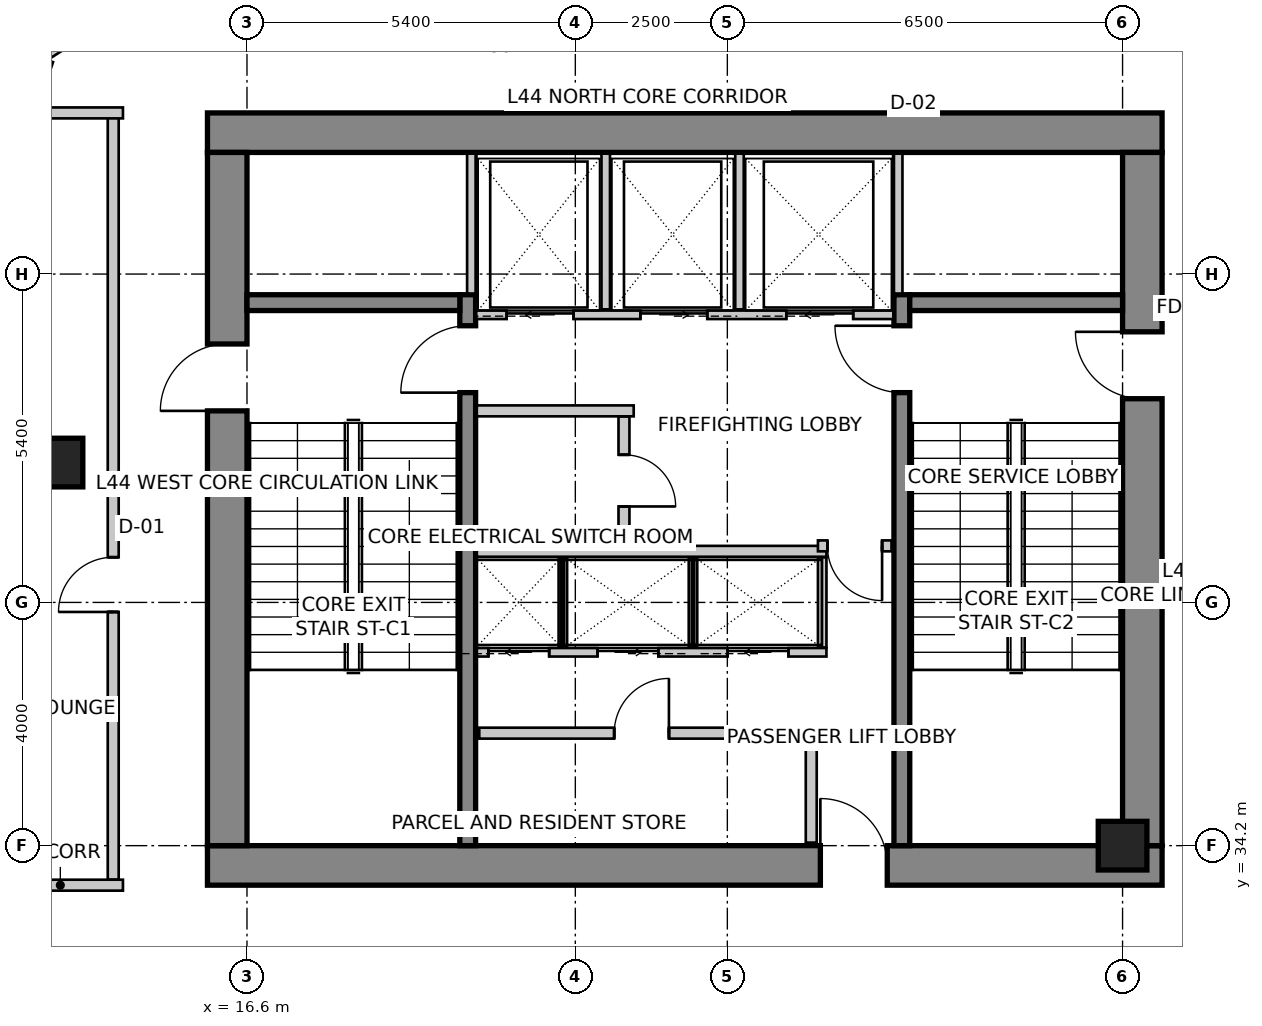
"""IFC4 building model, lengths in metres.
Left out: names, types, materials, properties, quantities, classifications, styles, units other than length and angle.
Written with IfcOpenShell. Run it as: python <this file> out.ifc"""

import sys

from ifc_helpers import new_model, si_unit, direction, frame, frame_2d, origin, origin_2d, place, context, subcontext, project, spatial, rectangle, extrude, source, transform, mapped, element, fill, save


model = new_model("IFC4")
c1 = context("Model", 3, precision=1e-05, world=origin(), true_north=direction((0.0, 1.0)))
c2 = subcontext(c1, "Body", "Model", "MODEL_VIEW")
j1 = project(units=[si_unit("LENGTHUNIT", "METRE"), si_unit("PLANEANGLEUNIT", "RADIAN")], contexts=[c1])
p1 = place(None, origin())
s1 = spatial("IfcSite", under=j1, at=p1, CompositionType="ELEMENT")
p2 = place(p1, origin())
s2 = spatial("IfcBuilding", under=s1, at=p2, CompositionType="ELEMENT")
p3 = place(p2, frame((0.0, 0.0, 178.2)))
s3 = spatial("IfcBuildingStorey", under=s2, at=p3, CompositionType="ELEMENT", Elevation=178.2)
p4 = place(p3, frame((15.95, 45.925, 0.0), z_axis=(0.0, 0.0, 1.0), x_axis=(1.0, 0.0, 0.0)))
e1 = element("IfcWall", 1, at=p4, inside=s3, PredefinedType="SHEAR", context=c2, shape_type="SweptSolid", body=[
    extrude(rectangle(XDim=15.7, YDim=0.65, at=frame_2d((7.85, 0.0))), origin(), (0.0, 0.0, 1.0), 5.2),
])
p5 = place(p3, frame((15.95, 33.875, 0.0), z_axis=(0.0, 0.0, 1.0), x_axis=(1.0, 0.0, 0.0)))
e2 = element("IfcWall", 2, at=p5, inside=s3, PredefinedType="SHEAR", context=c2, shape_type="SweptSolid", body=[
    extrude(rectangle(XDim=15.7, YDim=0.65, at=frame_2d((7.85, 0.0))), origin(), (0.0, 0.0, 1.0), 5.2),
])
m1 = source(origin(), c2, "Body", "SweptSolid", [
    extrude(rectangle(XDim=1.1, YDim=2.15, at=frame_2d((0.55, 1.075))), frame((0.0, 0.335, 0.0), z_axis=(0.0, -1.0, 0.0), x_axis=(1.0, 0.0, 0.0)), (0.0, 0.0, 1.0), 0.67),
])
p6 = place(p5, frame((10.08, 0.0, 0.0)))
e3 = element("IfcOpeningElement", 3, at=p6, cuts=e2, PredefinedType="OPENING", context=c2, shape_type="MappedRepresentation", body=[
    mapped(m1, transform((0.0, 0.0, 0.0), scale=1.0)),
])
p7 = place(p3, frame((16.275, 34.2, 0.0), z_axis=(0.0, 0.0, 1.0), x_axis=(0.0, 1.0, 0.0)))
e4 = element("IfcWall", 4, at=p7, inside=s3, PredefinedType="SHEAR", context=c2, shape_type="SweptSolid", body=[
    extrude(rectangle(XDim=11.4, YDim=0.65, at=frame_2d((5.7, 0.0))), origin(), (0.0, 0.0, 1.0), 5.2),
])
p8 = place(p7, frame((7.15, 0.0, 0.0)))
e5 = element("IfcOpeningElement", 5, at=p8, cuts=e4, PredefinedType="OPENING", context=c2, shape_type="MappedRepresentation", body=[
    mapped(m1, transform((0.0, 0.0, 0.0), scale=1.0)),
])
p9 = place(p3, frame((31.325, 34.2, 0.0), z_axis=(0.0, 0.0, 1.0), x_axis=(0.0, 1.0, 0.0)))
e6 = element("IfcWall", 6, at=p9, inside=s3, PredefinedType="SHEAR", context=c2, shape_type="SweptSolid", body=[
    extrude(rectangle(XDim=11.4, YDim=0.65, at=frame_2d((5.7, 0.0))), origin(), (0.0, 0.0, 1.0), 5.2),
])
p10 = place(p9, frame((7.35, 0.0, 0.0)))
e7 = element("IfcOpeningElement", 7, at=p10, cuts=e6, PredefinedType="OPENING", context=c2, shape_type="MappedRepresentation", body=[
    mapped(m1, transform((0.0, 0.0, 0.0), scale=1.0)),
])
p11 = place(p3, frame((20.23, 34.2, 0.0), z_axis=(0.0, 0.0, 1.0), x_axis=(0.0, 1.0, 0.0)))
e8 = element("IfcWall", 8, at=p11, inside=s3, PredefinedType="SHEAR", context=c2, shape_type="SweptSolid", body=[
    extrude(rectangle(XDim=9.06, YDim=0.26, at=frame_2d((4.53, 0.0))), origin(), (0.0, 0.0, 1.0), 5.2),
])
m2 = source(origin(), c2, "Body", "SweptSolid", [
    extrude(rectangle(XDim=1.1, YDim=2.15, at=frame_2d((0.55, 1.075))), frame((0.0, 0.14, 0.0), z_axis=(0.0, -1.0, 0.0), x_axis=(1.0, 0.0, 0.0)), (0.0, 0.0, 1.0), 0.28),
])
p12 = place(p11, frame((7.45, 0.0, 0.0)))
e9 = element("IfcOpeningElement", 9, at=p12, cuts=e8, PredefinedType="OPENING", context=c2, shape_type="MappedRepresentation", body=[
    mapped(m2, transform((0.0, 0.0, 0.0), scale=1.0)),
])
p13 = place(p3, frame((27.37, 34.2, 0.0), z_axis=(0.0, 0.0, 1.0), x_axis=(0.0, 1.0, 0.0)))
e10 = element("IfcWall", 10, at=p13, inside=s3, PredefinedType="SHEAR", context=c2, shape_type="SweptSolid", body=[
    extrude(rectangle(XDim=9.06, YDim=0.26, at=frame_2d((4.53, 0.0))), origin(), (0.0, 0.0, 1.0), 5.2),
])
p14 = place(p13, frame((7.45, 0.0, 0.0)))
e11 = element("IfcOpeningElement", 11, at=p14, cuts=e10, PredefinedType="OPENING", context=c2, shape_type="MappedRepresentation", body=[
    mapped(m2, transform((0.0, 0.0, 0.0), scale=1.0)),
])
for number, where, z_axis, x_axis in (
    (12, (16.6, 43.13, 0.0), (0.0, 0.0, 1.0), (1.0, 0.0, 0.0)),
    (13, (27.5, 43.13, 0.0), (0.0, 0.0, 1.0), (1.0, 0.0, 0.0)),
):
    element("IfcWall", number, at=place(p3, frame(where, z_axis=z_axis, x_axis=x_axis)), inside=s3, PredefinedType="SHEAR", context=c2, shape_type="SweptSolid", body=[
        extrude(rectangle(XDim=3.5, YDim=0.26, at=frame_2d((1.75, 0.0))), origin(), (0.0, 0.0, 1.0), 5.2),
    ])
m3 = source(origin(), c2, "Body", "SweptSolid", [
    extrude(rectangle(XDim=0.8, YDim=0.8, at=origin_2d()), origin(), (0.0, 0.0, 1.0), 5.2),
])
for number, where, z_axis, x_axis in (
    (14, (13.5, 40.5, 0.0), (0.0, 0.0, 1.0), (1.0, 0.0, 0.0)),
    (15, (31.0, 34.2, 0.0), (0.0, 0.0, 1.0), (1.0, 0.0, 0.0)),
):
    element("IfcColumn", number, at=place(p3, frame(where, z_axis=z_axis, x_axis=x_axis)), inside=s3, PredefinedType="COLUMN", context=c2, shape_type="MappedRepresentation", body=[
        mapped(m3, transform((0.0, 0.0, 0.0), scale=1.0)),
    ])
p15 = place(p3, frame((21.875, 52.742, 0.0), z_axis=(0.0, 0.0, 1.0), x_axis=(-0.843666375448, -0.536867811419, 0.0)))
e16 = element("IfcWall", 16, at=p15, inside=s3, PredefinedType="SOLIDWALL", context=c2, shape_type="SweptSolid", body=[
    extrude(rectangle(XDim=10.284, YDim=0.3, at=frame_2d((5.142, 0.0))), origin(), (0.0, 0.0, 1.0), 4.95),
])
m4 = source(origin(), c2, "Body", "SweptSolid", [
    extrude(rectangle(XDim=2.4, YDim=2.2, at=frame_2d((1.2, 1.1))), frame((0.0, 0.16, 0.0), z_axis=(0.0, -1.0, 0.0), x_axis=(1.0, 0.0, 0.0)), (0.0, 0.0, 1.0), 0.32),
])
p16 = place(p15, frame((3.307, 0.0, 0.85)))
e17 = element("IfcOpeningElement", 17, at=p16, cuts=e16, PredefinedType="OPENING", context=c2, shape_type="MappedRepresentation", body=[
    mapped(m4, transform((0.0, 0.0, 0.0), scale=1.0)),
])
p17 = place(p3, frame((13.269, 47.134, 0.0), z_axis=(0.0, 0.0, 1.0), x_axis=(-0.319920776449, -0.947444297464, 0.0)))
e18 = element("IfcWall", 18, at=p17, inside=s3, PredefinedType="SOLIDWALL", context=c2, shape_type="SweptSolid", body=[
    extrude(rectangle(XDim=16.133, YDim=0.3, at=frame_2d((8.067, 0.0))), origin(), (0.0, 0.0, 1.0), 4.95),
])
m5 = source(origin(), c2, "Body", "SweptSolid", [
    extrude(rectangle(XDim=2.8, YDim=2.4, at=frame_2d((1.4, 1.2))), frame((0.0, 0.16, 0.0), z_axis=(0.0, -1.0, 0.0), x_axis=(1.0, 0.0, 0.0)), (0.0, 0.0, 1.0), 0.32),
])
p18 = place(p17, frame((2.163, 0.0, 0.85)))
e19 = element("IfcOpeningElement", 19, at=p18, cuts=e18, PredefinedType="OPENING", context=c2, shape_type="MappedRepresentation", body=[
    mapped(m5, transform((0.0, 0.0, 0.0), scale=1.0)),
])
p19 = place(p17, frame((7.26, 0.0, 0.85)))
e20 = element("IfcOpeningElement", 20, at=p19, cuts=e18, PredefinedType="OPENING", context=c2, shape_type="MappedRepresentation", body=[
    mapped(m4, transform((0.0, 0.0, 0.0), scale=1.0)),
])
p20 = place(p17, frame((11.957, 0.0, 0.85)))
e21 = element("IfcOpeningElement", 21, at=p20, cuts=e18, PredefinedType="OPENING", context=c2, shape_type="MappedRepresentation", body=[
    mapped(m5, transform((0.0, 0.0, 0.0), scale=1.0)),
])
p21 = place(p3, frame((20.37, 42.93, 0.0), z_axis=(0.0, 0.0, 1.0), x_axis=(1.0, 0.0, 0.0)))
e22 = element("IfcWall", 22, at=p21, inside=s3, PredefinedType="SOLIDWALL", context=c2, shape_type="SweptSolid", body=[
    extrude(rectangle(XDim=6.86, YDim=0.14, at=frame_2d((3.43, 0.0))), origin(), (0.0, 0.0, 1.0), 4.95),
])
m6 = source(origin(), c2, "Body", "SweptSolid", [
    extrude(rectangle(XDim=1.1, YDim=2.15, at=frame_2d((0.55, 1.075))), frame((0.0, 0.08, 0.0), z_axis=(0.0, -1.0, 0.0), x_axis=(1.0, 0.0, 0.0)), (0.0, 0.0, 1.0), 0.16),
])
p22 = place(p21, frame((0.5, 0.0, 0.0)))
e23 = element("IfcOpeningElement", 23, at=p22, cuts=e22, PredefinedType="OPENING", context=c2, shape_type="MappedRepresentation", body=[
    mapped(m6, transform((0.0, 0.0, 0.0), scale=1.0)),
])
p23 = place(p21, frame((2.7, 0.0, 0.0)))
e24 = element("IfcOpeningElement", 24, at=p23, cuts=e22, PredefinedType="OPENING", context=c2, shape_type="MappedRepresentation", body=[
    mapped(m6, transform((0.0, 0.0, 0.0), scale=1.0)),
])
p24 = place(p21, frame((5.1, 0.0, 0.0)))
e25 = element("IfcOpeningElement", 25, at=p24, cuts=e22, PredefinedType="OPENING", context=c2, shape_type="MappedRepresentation", body=[
    mapped(m6, transform((0.0, 0.0, 0.0), scale=1.0)),
])
for number, where, z_axis, x_axis in (
    (26, (20.29, 43.28, 0.0), (0.0, 0.0, 1.0), (0.0, 1.0, 0.0)),
    (27, (27.31, 43.28, 0.0), (0.0, 0.0, 1.0), (0.0, 1.0, 0.0)),
):
    element("IfcWall", number, at=place(p3, frame(where, z_axis=z_axis, x_axis=x_axis)), inside=s3, PredefinedType="SOLIDWALL", context=c2, shape_type="SweptSolid", body=[
        extrude(rectangle(XDim=2.3, YDim=0.14, at=frame_2d((1.15, 0.0))), origin(), (0.0, 0.0, 1.0), 4.95),
    ])
for number, where, z_axis, x_axis in (
    (28, (22.5, 43.02, 0.0), (0.0, 0.0, 1.0), (0.0, 1.0, 0.0)),
    (29, (24.7, 43.02, 0.0), (0.0, 0.0, 1.0), (0.0, 1.0, 0.0)),
):
    element("IfcWall", number, at=place(p3, frame(where, z_axis=z_axis, x_axis=x_axis)), inside=s3, PredefinedType="SOLIDWALL", context=c2, shape_type="SweptSolid", body=[
        extrude(rectangle(XDim=2.56, YDim=0.14, at=frame_2d((1.28, 0.0))), origin(), (0.0, 0.0, 1.0), 4.95),
    ])
p25 = place(p3, frame((20.38, 37.38, 0.0), z_axis=(0.0, 0.0, 1.0), x_axis=(1.0, 0.0, 0.0)))
e30 = element("IfcWall", 30, at=p25, inside=s3, PredefinedType="SOLIDWALL", context=c2, shape_type="SweptSolid", body=[
    extrude(rectangle(XDim=5.75, YDim=0.14, at=frame_2d((2.875, 0.0))), origin(), (0.0, 0.0, 1.0), 4.95),
])
m7 = source(origin(), c2, "Body", "SweptSolid", [
    extrude(rectangle(XDim=1.0, YDim=2.15, at=frame_2d((0.5, 1.075))), frame((0.0, 0.08, 0.0), z_axis=(0.0, -1.0, 0.0), x_axis=(1.0, 0.0, 0.0)), (0.0, 0.0, 1.0), 0.16),
])
p26 = place(p25, frame((0.19, 0.0, 0.0)))
e31 = element("IfcOpeningElement", 31, at=p26, cuts=e30, PredefinedType="OPENING", context=c2, shape_type="MappedRepresentation", body=[
    mapped(m7, transform((0.0, 0.0, 0.0), scale=1.0)),
])
p27 = place(p25, frame((1.985, 0.0, 0.0)))
e32 = element("IfcOpeningElement", 32, at=p27, cuts=e30, PredefinedType="OPENING", context=c2, shape_type="MappedRepresentation", body=[
    mapped(m7, transform((0.0, 0.0, 0.0), scale=1.0)),
])
p28 = place(p25, frame((4.125, 0.0, 0.0)))
e33 = element("IfcOpeningElement", 33, at=p28, cuts=e30, PredefinedType="OPENING", context=c2, shape_type="MappedRepresentation", body=[
    mapped(m7, transform((0.0, 0.0, 0.0), scale=1.0)),
])
p29 = place(p3, frame((20.38, 39.04, 0.0), z_axis=(0.0, 0.0, 1.0), x_axis=(1.0, 0.0, 0.0)))
e34 = element("IfcWall", 34, at=p29, inside=s3, PredefinedType="SOLIDWALL", context=c2, shape_type="SweptSolid", body=[
    extrude(rectangle(XDim=5.75, YDim=0.18, at=frame_2d((2.875, 0.0))), origin(), (0.0, 0.0, 1.0), 4.95),
])
for number, where, z_axis, x_axis in (
    (35, (26.06, 37.46, 0.0), (0.0, 0.0, 1.0), (0.0, 1.0, 0.0)),
    (36, (21.795, 37.46, 0.0), (0.0, 0.0, 1.0), (0.0, 1.0, 0.0)),
    (37, (23.935, 37.46, 0.0), (0.0, 0.0, 1.0), (0.0, 1.0, 0.0)),
):
    element("IfcWall", number, at=place(p3, frame(where, z_axis=z_axis, x_axis=x_axis)), inside=s3, PredefinedType="SOLIDWALL", context=c2, shape_type="SweptSolid", body=[
        extrude(rectangle(XDim=1.48, YDim=0.14, at=frame_2d((0.74, 0.0))), origin(), (0.0, 0.0, 1.0), 4.95),
    ])
p30 = place(p3, frame((22.96, 41.35, 0.0), z_axis=(0.0, 0.0, 1.0), x_axis=(-1.0, 0.0, 0.0)))
e38 = element("IfcWall", 38, at=p30, inside=s3, PredefinedType="PARTITIONING", context=c2, shape_type="SweptSolid", body=[
    extrude(rectangle(XDim=2.58, YDim=0.18, at=frame_2d((1.29, 0.0))), origin(), (0.0, 0.0, 1.0), 4.95),
])
p31 = place(p3, frame((22.8, 41.256, 0.0), z_axis=(0.0, 0.0, 1.0), x_axis=(0.0, -1.0, 0.0)))
e39 = element("IfcWall", 39, at=p31, inside=s3, PredefinedType="PARTITIONING", context=c2, shape_type="SweptSolid", body=[
    extrude(rectangle(XDim=2.106, YDim=0.18, at=frame_2d((1.053, 0.0))), origin(), (0.0, 0.0, 1.0), 4.95),
])
m8 = source(origin(), c2, "Body", "SweptSolid", [
    extrude(rectangle(XDim=0.85, YDim=2.15, at=frame_2d((0.425, 1.075))), frame((0.0, 0.1, 0.0), z_axis=(0.0, -1.0, 0.0), x_axis=(1.0, 0.0, 0.0)), (0.0, 0.0, 1.0), 0.2),
])
p32 = place(p31, frame((0.628, 0.0, 0.0)))
e40 = element("IfcOpeningElement", 40, at=p32, cuts=e39, PredefinedType="OPENING", context=c2, shape_type="MappedRepresentation", body=[
    mapped(m8, transform((0.0, 0.0, 0.0), scale=1.0)),
])
p33 = place(p3, frame((27.2, 39.13, 0.0), z_axis=(0.0, 0.0, 1.0), x_axis=(-1.0, 0.0, 0.0)))
e41 = element("IfcWall", 41, at=p33, inside=s3, PredefinedType="PARTITIONING", context=c2, shape_type="SweptSolid", body=[
    extrude(rectangle(XDim=1.21, YDim=0.18, at=frame_2d((0.605, 0.0))), origin(), (0.0, 0.0, 1.0), 4.95),
])
m9 = source(origin(), c2, "Body", "SweptSolid", [
    extrude(rectangle(XDim=0.9, YDim=2.15, at=frame_2d((0.45, 1.075))), frame((0.0, 0.1, 0.0), z_axis=(0.0, -1.0, 0.0), x_axis=(1.0, 0.0, 0.0)), (0.0, 0.0, 1.0), 0.2),
])
p34 = place(p33, frame((0.155, 0.0, 0.0)))
e42 = element("IfcOpeningElement", 42, at=p34, cuts=e41, PredefinedType="OPENING", context=c2, shape_type="MappedRepresentation", body=[
    mapped(m9, transform((0.0, 0.0, 0.0), scale=1.0)),
])
p35 = place(p3, frame((20.42, 36.05, 0.0), z_axis=(0.0, 0.0, 1.0), x_axis=(1.0, 0.0, 0.0)))
e43 = element("IfcWall", 43, at=p35, inside=s3, PredefinedType="PARTITIONING", context=c2, shape_type="SweptSolid", body=[
    extrude(rectangle(XDim=5.46, YDim=0.18, at=frame_2d((2.73, 0.0))), origin(), (0.0, 0.0, 1.0), 4.95),
])
p36 = place(p35, frame((2.219, 0.0, 0.0)))
e44 = element("IfcOpeningElement", 44, at=p36, cuts=e43, PredefinedType="OPENING", context=c2, shape_type="MappedRepresentation", body=[
    mapped(m9, transform((0.0, 0.0, 0.0), scale=1.0)),
])
p37 = place(p3, frame((25.88, 35.956, 0.0), z_axis=(0.0, 0.0, 1.0), x_axis=(0.0, -1.0, 0.0)))
e45 = element("IfcWall", 45, at=p37, inside=s3, PredefinedType="PARTITIONING", context=c2, shape_type="SweptSolid", body=[
    extrude(rectangle(XDim=1.706, YDim=0.18, at=frame_2d((0.853, 0.0))), origin(), (0.0, 0.0, 1.0), 4.242),
])
p38 = place(p3, frame((12.5, 33.55, 0.0), z_axis=(0.0, 0.0, 1.0), x_axis=(1.0, 0.0, 0.0)))
e46 = element("IfcWall", 46, at=p38, inside=s3, PredefinedType="PARTITIONING", context=c2, shape_type="SweptSolid", body=[
    extrude(rectangle(XDim=2.06, YDim=0.18, at=frame_2d((1.03, 0.0))), origin(), (0.0, 0.0, 1.0), 4.95),
])
p39 = place(p3, frame((14.4, 33.644, 0.0), z_axis=(0.0, 0.0, 1.0), x_axis=(0.0, 1.0, 0.0)))
e47 = element("IfcWall", 47, at=p39, inside=s3, PredefinedType="PARTITIONING", context=c2, shape_type="SweptSolid", body=[
    extrude(rectangle(XDim=12.606, YDim=0.18, at=frame_2d((6.303, 0.0))), origin(), (0.0, 0.0, 1.0), 4.95),
])
p40 = place(p39, frame((4.399, 0.0, 0.0)))
e48 = element("IfcOpeningElement", 48, at=p40, cuts=e47, PredefinedType="OPENING", context=c2, shape_type="MappedRepresentation", body=[
    mapped(m9, transform((0.0, 0.0, 0.0), scale=1.0)),
])
p41 = place(p3, frame((14.56, 46.25, 0.0), z_axis=(0.0, 0.0, 1.0), x_axis=(-1.0, 0.0, 0.0)))
e49 = element("IfcWall", 49, at=p41, inside=s3, PredefinedType="PARTITIONING", context=c2, shape_type="SweptSolid", body=[
    extrude(rectangle(XDim=1.469, YDim=0.18, at=frame_2d((0.734, 0.0))), origin(), (0.0, 0.0, 1.0), 4.95),
])
m10 = source(origin(), c2, "Body", "SweptSolid", [
    extrude(rectangle(XDim=1.1, YDim=2.15, at=frame_2d((0.55, 1.075))), frame((0.0, 0.025, 0.0), z_axis=(0.0, -1.0, 0.0), x_axis=(1.0, 0.0, 0.0)), (0.0, 0.0, 1.0), 0.05),
])
p42 = place(p22, origin())
e50 = element("IfcDoor", 50, at=p42, inside=s3, OperationType="SLIDING_TO_LEFT", PredefinedType="DOOR", context=c2, shape_type="MappedRepresentation", body=[
    mapped(m10, transform((0.0, 0.0, 0.0), scale=1.0)),
])
fill(e23, e50)
p43 = place(p23, origin())
e51 = element("IfcDoor", 51, at=p43, inside=s3, OperationType="SLIDING_TO_RIGHT", PredefinedType="DOOR", context=c2, shape_type="MappedRepresentation", body=[
    mapped(m10, transform((0.0, 0.0, 0.0), scale=1.0)),
])
fill(e24, e51)
m11 = source(origin(), c2, "Body", "SweptSolid", [
    extrude(rectangle(XDim=1.1, YDim=2.15, at=frame_2d((0.55, 1.075))), frame((0.0, 0.025, 0.0), z_axis=(0.0, -1.0, 0.0), x_axis=(1.0, 0.0, 0.0)), (0.0, 0.0, 1.0), 0.05),
])
p44 = place(p24, origin())
e52 = element("IfcDoor", 52, at=p44, inside=s3, OperationType="SLIDING_TO_LEFT", PredefinedType="DOOR", context=c2, shape_type="MappedRepresentation", body=[
    mapped(m11, transform((0.0, 0.0, 0.0), scale=1.0)),
])
fill(e25, e52)
m12 = source(origin(), c2, "Body", "SweptSolid", [
    extrude(rectangle(XDim=1.0, YDim=2.15, at=frame_2d((0.5, 1.075))), frame((0.0, 0.025, 0.0), z_axis=(0.0, -1.0, 0.0), x_axis=(1.0, 0.0, 0.0)), (0.0, 0.0, 1.0), 0.05),
])
p45 = place(p26, origin())
e53 = element("IfcDoor", 53, at=p45, inside=s3, OperationType="SLIDING_TO_LEFT", PredefinedType="DOOR", context=c2, shape_type="MappedRepresentation", body=[
    mapped(m12, transform((0.0, 0.0, 0.0), scale=1.0)),
])
fill(e31, e53)
p46 = place(p27, origin())
e54 = element("IfcDoor", 54, at=p46, inside=s3, OperationType="SLIDING_TO_RIGHT", PredefinedType="DOOR", context=c2, shape_type="MappedRepresentation", body=[
    mapped(m12, transform((0.0, 0.0, 0.0), scale=1.0)),
])
fill(e32, e54)
p47 = place(p28, origin())
e55 = element("IfcDoor", 55, at=p47, inside=s3, OperationType="SLIDING_TO_LEFT", PredefinedType="DOOR", context=c2, shape_type="MappedRepresentation", body=[
    mapped(m12, transform((0.0, 0.0, 0.0), scale=1.0)),
])
fill(e33, e55)
m13 = source(origin(), c2, "Body", "SweptSolid", [
    extrude(rectangle(XDim=1.1, YDim=2.15, at=frame_2d((0.55, 1.075))), frame((0.0, 0.025, 0.0), z_axis=(0.0, -1.0, 0.0), x_axis=(1.0, 0.0, 0.0)), (0.0, 0.0, 1.0), 0.05),
])
p48 = place(p12, origin())
e56 = element("IfcDoor", 56, at=p48, inside=s3, OperationType="SINGLE_SWING_LEFT", PredefinedType="DOOR", context=c2, shape_type="MappedRepresentation", body=[
    mapped(m13, transform((0.0, 0.0, 0.0), scale=1.0)),
])
fill(e9, e56)
p49 = place(p14, origin())
e57 = element("IfcDoor", 57, at=p49, inside=s3, OperationType="SINGLE_SWING_RIGHT", PredefinedType="DOOR", context=c2, shape_type="MappedRepresentation", body=[
    mapped(m13, transform((0.0, 0.0, 0.0), scale=1.0)),
])
fill(e11, e57)
p50 = place(p8, origin())
e58 = element("IfcDoor", 58, at=p50, inside=s3, OperationType="SINGLE_SWING_LEFT", PredefinedType="DOOR", context=c2, shape_type="MappedRepresentation", body=[
    mapped(m13, transform((0.0, 0.0, 0.0), scale=1.0)),
])
fill(e5, e58)
p51 = place(p10, origin())
e59 = element("IfcDoor", 59, at=p51, inside=s3, OperationType="SINGLE_SWING_RIGHT", PredefinedType="DOOR", context=c2, shape_type="MappedRepresentation", body=[
    mapped(m13, transform((0.0, 0.0, 0.0), scale=1.0)),
])
fill(e7, e59)
p52 = place(p6, origin())
e60 = element("IfcDoor", 60, at=p52, inside=s3, OperationType="SINGLE_SWING_LEFT", PredefinedType="DOOR", context=c2, shape_type="MappedRepresentation", body=[
    mapped(m13, transform((0.0, 0.0, 0.0), scale=1.0)),
])
fill(e3, e60)
m14 = source(origin(), c2, "Body", "SweptSolid", [
    extrude(rectangle(XDim=0.85, YDim=2.15, at=frame_2d((0.425, 1.075))), frame((0.0, 0.025, 0.0), z_axis=(0.0, -1.0, 0.0), x_axis=(1.0, 0.0, 0.0)), (0.0, 0.0, 1.0), 0.05),
])
p53 = place(p32, origin())
e61 = element("IfcDoor", 61, at=p53, inside=s3, OperationType="SINGLE_SWING_RIGHT", PredefinedType="DOOR", context=c2, shape_type="MappedRepresentation", body=[
    mapped(m14, transform((0.0, 0.0, 0.0), scale=1.0)),
])
fill(e40, e61)
m15 = source(origin(), c2, "Body", "SweptSolid", [
    extrude(rectangle(XDim=0.9, YDim=2.15, at=frame_2d((0.45, 1.075))), frame((0.0, 0.025, 0.0), z_axis=(0.0, -1.0, 0.0), x_axis=(1.0, 0.0, 0.0)), (0.0, 0.0, 1.0), 0.05),
])
p54 = place(p34, origin())
e62 = element("IfcDoor", 62, at=p54, inside=s3, OperationType="SINGLE_SWING_LEFT", PredefinedType="DOOR", context=c2, shape_type="MappedRepresentation", body=[
    mapped(m15, transform((0.0, 0.0, 0.0), scale=1.0)),
])
fill(e42, e62)
p55 = place(p36, origin())
e63 = element("IfcDoor", 63, at=p55, inside=s3, OperationType="SINGLE_SWING_RIGHT", PredefinedType="DOOR", context=c2, shape_type="MappedRepresentation", body=[
    mapped(m15, transform((0.0, 0.0, 0.0), scale=1.0)),
])
fill(e44, e63)
m16 = source(origin(), c2, "Body", "SweptSolid", [
    extrude(rectangle(XDim=0.9, YDim=2.15, at=frame_2d((0.45, 1.075))), frame((0.0, 0.025, 0.0), z_axis=(0.0, -1.0, 0.0), x_axis=(1.0, 0.0, 0.0)), (0.0, 0.0, 1.0), 0.05),
])
p56 = place(p40, origin())
e64 = element("IfcDoor", 64, at=p56, inside=s3, OperationType="SINGLE_SWING_LEFT", PredefinedType="DOOR", context=c2, shape_type="MappedRepresentation", body=[
    mapped(m16, transform((0.0, 0.0, 0.0), scale=1.0)),
])
fill(e48, e64)
save(model, sys.argv[1])
